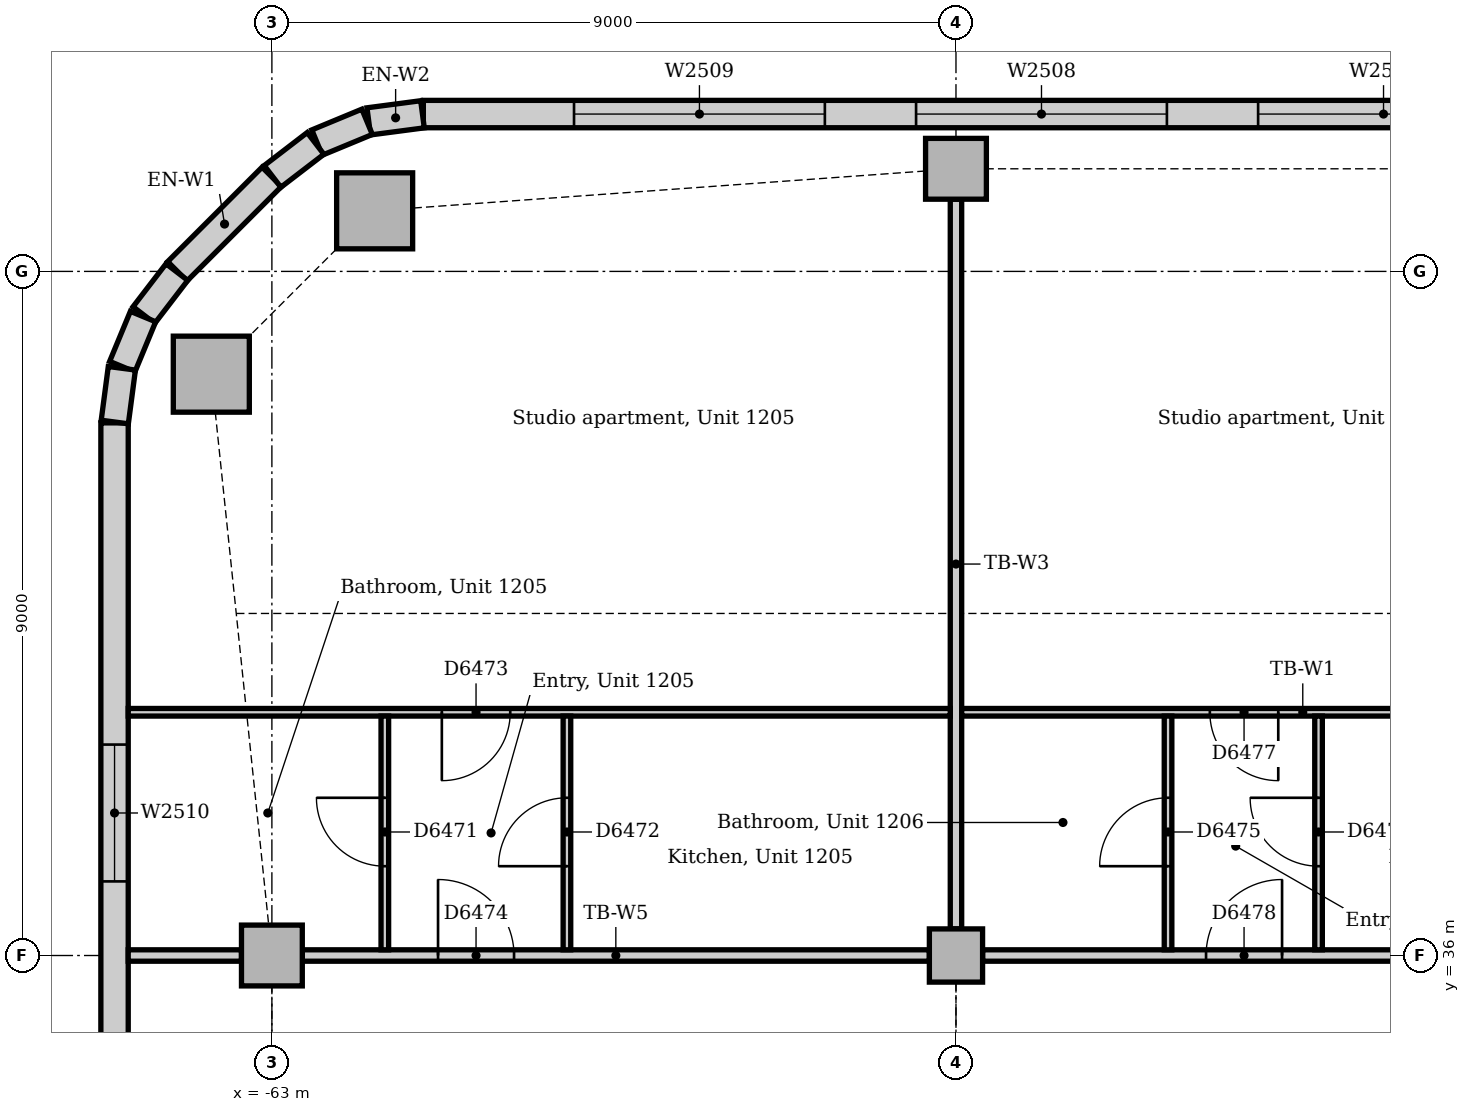
"""IFC4 building model, lengths in metres.
Left out: names, types, materials, properties, quantities, classifications, styles, units other than length and angle.
Written with IfcOpenShell. Run it as: python <this file> out.ifc"""

import sys

from ifc_helpers import new_model, si_unit, direction, frame, frame_2d, origin, origin_2d, place, context, subcontext, project, spatial, rectangle, extrude, element, fill, save


model = new_model("IFC4")
c1 = context("Model", 3, precision=1e-05, world=origin(), true_north=direction((0.0, 1.0)))
c2 = subcontext(c1, "Body", "Model", "MODEL_VIEW")
j1 = project(units=[si_unit("LENGTHUNIT", "METRE"), si_unit("PLANEANGLEUNIT", "RADIAN")], contexts=[c1])
p1 = place(None, origin())
s1 = spatial("IfcSite", under=j1, at=p1, CompositionType="ELEMENT")
p2 = place(p1, origin())
s2 = spatial("IfcBuilding", under=s1, at=p2, CompositionType="ELEMENT")
p3 = place(p2, frame((0.0, 0.0, 55.0)))
s3 = spatial("IfcBuildingStorey", under=s2, at=p3, CompositionType="ELEMENT", Elevation=55.0)
for number, where, z_axis, x_axis in (
    (1, (-61.648, 45.797, 0.0), (0.0, 0.0, 1.0), (1.0, 0.0, 0.0)),
    (2, (-63.797, 43.648, 0.0), (0.0, 0.0, 1.0), (1.0, 0.0, 0.0)),
):
    element("IfcColumn", number, at=place(p3, frame(where, z_axis=z_axis, x_axis=x_axis)), inside=s3, PredefinedType="COLUMN", context=c2, shape_type="SweptSolid", body=[
        extrude(rectangle(XDim=1.0, YDim=1.0, at=origin_2d()), origin(), (0.0, 0.0, 1.0), 3.85),
    ])
for number, where, z_axis, x_axis in (
    (3, (-54.0, 46.35, 0.0), (0.0, 0.0, 1.0), (1.0, 0.0, 0.0)),
    (4, (-63.0, 36.0, 0.0), (0.0, 0.0, 1.0), (1.0, 0.0, 0.0)),
):
    element("IfcColumn", number, at=place(p3, frame(where, z_axis=z_axis, x_axis=x_axis)), inside=s3, PredefinedType="COLUMN", context=c2, shape_type="SweptSolid", body=[
        extrude(rectangle(XDim=0.8, YDim=0.8, at=origin_2d()), origin(), (0.0, 0.0, 1.0), 3.85),
    ])
p4 = place(p3, frame((-54.0, 36.0, 0.0), z_axis=(0.0, 0.0, 1.0), x_axis=(1.0, 0.0, 0.0)))
e5 = element("IfcColumn", 5, at=p4, inside=s3, PredefinedType="COLUMN", context=c2, shape_type="SweptSolid", body=[
    extrude(rectangle(XDim=0.7, YDim=0.7, at=origin_2d()), origin(), (0.0, 0.0, 1.0), 3.85),
])
p5 = place(p3, frame((-31.243, 47.07, 0.0), z_axis=(0.0, 0.0, 1.0), x_axis=(-1.0, 0.0, 0.0)))
e6 = element("IfcWall", 6, at=p5, inside=s3, PredefinedType="STANDARD", context=c2, shape_type="SweptSolid", body=[
    extrude(rectangle(XDim=29.765, YDim=0.36, at=frame_2d((14.882, 0.0))), origin(), (0.0, 0.0, 1.0), 3.85),
])
p6 = place(p5, frame((1.982, 0.0, 0.9)))
e7 = element("IfcOpeningElement", 7, at=p6, cuts=e6, PredefinedType="OPENING", context=c2, shape_type="SweptSolid", body=[
    extrude(rectangle(XDim=3.3, YDim=1.6, at=frame_2d((1.65, 0.8))), frame((0.0, 0.19, 0.0), z_axis=(0.0, -1.0, 0.0), x_axis=(1.0, 0.0, 0.0)), (0.0, 0.0, 1.0), 0.38),
])
p7 = place(p5, frame((6.482, 0.0, 0.9)))
e8 = element("IfcOpeningElement", 8, at=p7, cuts=e6, PredefinedType="OPENING", context=c2, shape_type="SweptSolid", body=[
    extrude(rectangle(XDim=3.3, YDim=1.6, at=frame_2d((1.65, 0.8))), frame((0.0, 0.19, 0.0), z_axis=(0.0, -1.0, 0.0), x_axis=(1.0, 0.0, 0.0)), (0.0, 0.0, 1.0), 0.38),
])
p8 = place(p5, frame((10.982, 0.0, 0.9)))
e9 = element("IfcOpeningElement", 9, at=p8, cuts=e6, PredefinedType="OPENING", context=c2, shape_type="SweptSolid", body=[
    extrude(rectangle(XDim=3.3, YDim=1.6, at=frame_2d((1.65, 0.8))), frame((0.0, 0.19, 0.0), z_axis=(0.0, -1.0, 0.0), x_axis=(1.0, 0.0, 0.0)), (0.0, 0.0, 1.0), 0.38),
])
p9 = place(p5, frame((15.482, 0.0, 0.9)))
e10 = element("IfcOpeningElement", 10, at=p9, cuts=e6, PredefinedType="OPENING", context=c2, shape_type="SweptSolid", body=[
    extrude(rectangle(XDim=3.3, YDim=1.6, at=frame_2d((1.65, 0.8))), frame((0.0, 0.19, 0.0), z_axis=(0.0, -1.0, 0.0), x_axis=(1.0, 0.0, 0.0)), (0.0, 0.0, 1.0), 0.38),
])
p10 = place(p5, frame((19.982, 0.0, 0.9)))
e11 = element("IfcOpeningElement", 11, at=p10, cuts=e6, PredefinedType="OPENING", context=c2, shape_type="SweptSolid", body=[
    extrude(rectangle(XDim=3.3, YDim=1.6, at=frame_2d((1.65, 0.8))), frame((0.0, 0.19, 0.0), z_axis=(0.0, -1.0, 0.0), x_axis=(1.0, 0.0, 0.0)), (0.0, 0.0, 1.0), 0.38),
])
p11 = place(p5, frame((24.482, 0.0, 0.9)))
e12 = element("IfcOpeningElement", 12, at=p11, cuts=e6, PredefinedType="OPENING", context=c2, shape_type="SweptSolid", body=[
    extrude(rectangle(XDim=3.3, YDim=1.6, at=frame_2d((1.65, 0.8))), frame((0.0, 0.19, 0.0), z_axis=(0.0, -1.0, 0.0), x_axis=(1.0, 0.0, 0.0)), (0.0, 0.0, 1.0), 0.38),
])
p12 = place(p3, frame((-63.001, 46.244, 0.0), z_axis=(0.0, 0.0, 1.0), x_axis=(-0.707106781187, -0.707106781187, 0.0)))
e13 = element("IfcWall", 13, at=p12, inside=s3, PredefinedType="STANDARD", context=c2, shape_type="SweptSolid", body=[
    extrude(rectangle(XDim=1.757, YDim=0.36, at=frame_2d((0.879, 0.0))), origin(), (0.0, 0.0, 1.0), 3.85),
])
p13 = place(p3, frame((-65.07, 43.007, 0.0), z_axis=(0.0, 0.0, 1.0), x_axis=(0.0, -1.0, 0.0)))
e14 = element("IfcWall", 14, at=p13, inside=s3, PredefinedType="STANDARD", context=c2, shape_type="SweptSolid", body=[
    extrude(rectangle(XDim=23.765, YDim=0.36, at=frame_2d((11.882, 0.0))), origin(), (0.0, 0.0, 1.0), 3.85),
])
p14 = place(p13, frame((4.232, 0.0, 0.9)))
e15 = element("IfcOpeningElement", 15, at=p14, cuts=e14, PredefinedType="OPENING", context=c2, shape_type="SweptSolid", body=[
    extrude(rectangle(XDim=1.8, YDim=1.6, at=frame_2d((0.9, 0.8))), frame((0.0, 0.19, 0.0), z_axis=(0.0, -1.0, 0.0), x_axis=(1.0, 0.0, 0.0)), (0.0, 0.0, 1.0), 0.38),
])
p15 = place(p13, frame((9.332, 0.0, 0.9)))
e16 = element("IfcOpeningElement", 16, at=p15, cuts=e14, PredefinedType="OPENING", context=c2, shape_type="SweptSolid", body=[
    extrude(rectangle(XDim=1.8, YDim=1.6, at=frame_2d((0.9, 0.8))), frame((0.0, 0.19, 0.0), z_axis=(0.0, -1.0, 0.0), x_axis=(1.0, 0.0, 0.0)), (0.0, 0.0, 1.0), 0.38),
])
p16 = place(p13, frame((12.482, 0.0, 0.9)))
e17 = element("IfcOpeningElement", 17, at=p16, cuts=e14, PredefinedType="OPENING", context=c2, shape_type="SweptSolid", body=[
    extrude(rectangle(XDim=3.3, YDim=1.6, at=frame_2d((1.65, 0.8))), frame((0.0, 0.19, 0.0), z_axis=(0.0, -1.0, 0.0), x_axis=(1.0, 0.0, 0.0)), (0.0, 0.0, 1.0), 0.38),
])
p17 = place(p13, frame((16.982, 0.0, 0.9)))
e18 = element("IfcOpeningElement", 18, at=p17, cuts=e14, PredefinedType="OPENING", context=c2, shape_type="SweptSolid", body=[
    extrude(rectangle(XDim=3.3, YDim=1.6, at=frame_2d((1.65, 0.8))), frame((0.0, 0.19, 0.0), z_axis=(0.0, -1.0, 0.0), x_axis=(1.0, 0.0, 0.0)), (0.0, 0.0, 1.0), 0.38),
])
for number, where, z_axis, x_axis in (
    (19, (-61.019, 47.067, 0.0), (0.0, 0.0, 1.0), (-0.991, -0.131, 0.0)),
    (20, (-61.747, 46.968, 0.0), (0.0, 0.0, 1.0), (-0.924, -0.383, 0.0)),
):
    element("IfcWall", number, at=place(p3, frame(where, z_axis=z_axis, x_axis=x_axis)), inside=s3, PredefinedType="STANDARD", context=c2, shape_type="SweptSolid", body=[
        extrude(rectangle(XDim=0.713, YDim=0.36, at=frame_2d((0.356, 0.0))), origin(), (0.0, 0.0, 1.0), 3.85),
    ])
for number, where, z_axis, x_axis in (
    (21, (-62.425, 46.684, 0.0), (0.0, 0.0, 1.0), (-0.793, -0.609, 0.0)),
    (22, (-64.25, 44.991, 0.0), (0.0, 0.0, 1.0), (-0.609, -0.793, 0.0)),
):
    element("IfcWall", number, at=place(p3, frame(where, z_axis=z_axis, x_axis=x_axis)), inside=s3, PredefinedType="STANDARD", context=c2, shape_type="SweptSolid", body=[
        extrude(rectangle(XDim=0.713, YDim=0.36, at=frame_2d((0.357, 0.0))), origin(), (0.0, 0.0, 1.0), 3.85),
    ])
for number, where, z_axis, x_axis in (
    (23, (-64.695, 44.406, 0.0), (0.0, 0.0, 1.0), (-0.383, -0.924, 0.0)),
    (24, (-64.974, 43.726, 0.0), (0.0, 0.0, 1.0), (-0.131, -0.991, 0.0)),
):
    element("IfcWall", number, at=place(p3, frame(where, z_axis=z_axis, x_axis=x_axis)), inside=s3, PredefinedType="STANDARD", context=c2, shape_type="SweptSolid", body=[
        extrude(rectangle(XDim=0.713, YDim=0.36, at=frame_2d((0.356, 0.0))), origin(), (0.0, 0.0, 1.0), 3.85),
    ])
p18 = place(p3, frame((-53.65, 36.0, 0.0), z_axis=(0.0, 0.0, 1.0), x_axis=(1.0, 0.0, 0.0)))
e25 = element("IfcWall", 25, at=p18, inside=s3, PredefinedType="PARTITIONING", context=c2, shape_type="SweptSolid", body=[
    extrude(rectangle(XDim=8.3, YDim=0.15, at=frame_2d((4.15, 0.0))), origin(), (0.0, 0.0, 1.0), 3.158),
])
p19 = place(p18, frame((2.94, 0.0, 0.0)))
e26 = element("IfcOpeningElement", 26, at=p19, cuts=e25, PredefinedType="OPENING", context=c2, shape_type="SweptSolid", body=[
    extrude(rectangle(XDim=1.0, YDim=2.1, at=frame_2d((0.5, 1.05))), frame((0.0, 0.085, 0.0), z_axis=(0.0, -1.0, 0.0), x_axis=(1.0, 0.0, 0.0)), (0.0, 0.0, 1.0), 0.17),
])
p20 = place(p3, frame((-62.6, 36.0, 0.0), z_axis=(0.0, 0.0, 1.0), x_axis=(1.0, 0.0, 0.0)))
e27 = element("IfcWall", 27, at=p20, inside=s3, PredefinedType="PARTITIONING", context=c2, shape_type="SweptSolid", body=[
    extrude(rectangle(XDim=8.25, YDim=0.15, at=frame_2d((4.125, 0.0))), origin(), (0.0, 0.0, 1.0), 3.158),
])
p21 = place(p20, frame((1.786, 0.0, 0.0)))
e28 = element("IfcOpeningElement", 28, at=p21, cuts=e27, PredefinedType="OPENING", context=c2, shape_type="SweptSolid", body=[
    extrude(rectangle(XDim=1.0, YDim=2.1, at=frame_2d((0.5, 1.05))), frame((0.0, 0.085, 0.0), z_axis=(0.0, -1.0, 0.0), x_axis=(1.0, 0.0, 0.0)), (0.0, 0.0, 1.0), 0.17),
])
p22 = place(p3, frame((-64.89, 36.0, 0.0), z_axis=(0.0, 0.0, 1.0), x_axis=(1.0, 0.0, 0.0)))
e29 = element("IfcWall", 29, at=p22, inside=s3, PredefinedType="PARTITIONING", context=c2, shape_type="SweptSolid", body=[
    extrude(rectangle(XDim=1.49, YDim=0.15, at=frame_2d((0.745, 0.0))), origin(), (0.0, 0.0, 1.0), 3.85),
])
p23 = place(p3, frame((-54.0, 36.35, 0.0), z_axis=(0.0, 0.0, 1.0), x_axis=(0.0, 1.0, 0.0)))
e30 = element("IfcWall", 30, at=p23, inside=s3, PredefinedType="PARTITIONING", context=c2, shape_type="SweptSolid", body=[
    extrude(rectangle(XDim=9.6, YDim=0.15, at=frame_2d((4.8, 0.0))), origin(), (0.0, 0.0, 1.0), 3.256),
])
p24 = place(p3, frame((-53.925, 39.2, 0.0), z_axis=(0.0, 0.0, 1.0), x_axis=(1.0, 0.0, 0.0)))
e31 = element("IfcWall", 31, at=p24, inside=s3, PredefinedType="PARTITIONING", context=c2, shape_type="SweptSolid", body=[
    extrude(rectangle(XDim=8.975, YDim=0.1, at=frame_2d((4.487, 0.0))), origin(), (0.0, 0.0, 1.0), 3.85),
])
p25 = place(p24, frame((3.265, 0.0, 0.0)))
e32 = element("IfcOpeningElement", 32, at=p25, cuts=e31, PredefinedType="OPENING", context=c2, shape_type="SweptSolid", body=[
    extrude(rectangle(XDim=0.9, YDim=2.1, at=frame_2d((0.45, 1.05))), frame((0.0, 0.06, 0.0), z_axis=(0.0, -1.0, 0.0), x_axis=(1.0, 0.0, 0.0)), (0.0, 0.0, 1.0), 0.12),
])
p26 = place(p3, frame((-64.89, 39.2, 0.0), z_axis=(0.0, 0.0, 1.0), x_axis=(1.0, 0.0, 0.0)))
e33 = element("IfcWall", 33, at=p26, inside=s3, PredefinedType="PARTITIONING", context=c2, shape_type="SweptSolid", body=[
    extrude(rectangle(XDim=10.815, YDim=0.1, at=frame_2d((5.407, 0.0))), origin(), (0.0, 0.0, 1.0), 3.85),
])
p27 = place(p26, frame((4.126, 0.0, 0.0)))
e34 = element("IfcOpeningElement", 34, at=p27, cuts=e33, PredefinedType="OPENING", context=c2, shape_type="SweptSolid", body=[
    extrude(rectangle(XDim=0.9, YDim=2.1, at=frame_2d((0.45, 1.05))), frame((0.0, 0.06, 0.0), z_axis=(0.0, -1.0, 0.0), x_axis=(1.0, 0.0, 0.0)), (0.0, 0.0, 1.0), 0.12),
])
p28 = place(p3, frame((-61.514, 36.075, 0.0), z_axis=(0.0, 0.0, 1.0), x_axis=(0.0, 1.0, 0.0)))
e35 = element("IfcWall", 35, at=p28, inside=s3, PredefinedType="PARTITIONING", context=c2, shape_type="SweptSolid", body=[
    extrude(rectangle(XDim=3.075, YDim=0.1, at=frame_2d((1.538, 0.0))), origin(), (0.0, 0.0, 1.0), 3.85),
])
p29 = place(p28, frame((1.1, 0.0, 0.0)))
e36 = element("IfcOpeningElement", 36, at=p29, cuts=e35, PredefinedType="OPENING", context=c2, shape_type="SweptSolid", body=[
    extrude(rectangle(XDim=0.9, YDim=2.1, at=frame_2d((0.45, 1.05))), frame((0.0, 0.06, 0.0), z_axis=(0.0, -1.0, 0.0), x_axis=(1.0, 0.0, 0.0)), (0.0, 0.0, 1.0), 0.12),
])
p30 = place(p3, frame((-59.118, 36.075, 0.0), z_axis=(0.0, 0.0, 1.0), x_axis=(0.0, 1.0, 0.0)))
e37 = element("IfcWall", 37, at=p30, inside=s3, PredefinedType="PARTITIONING", context=c2, shape_type="SweptSolid", body=[
    extrude(rectangle(XDim=3.075, YDim=0.1, at=frame_2d((1.538, 0.0))), origin(), (0.0, 0.0, 1.0), 3.85),
])
p31 = place(p30, frame((1.1, 0.0, 0.0)))
e38 = element("IfcOpeningElement", 38, at=p31, cuts=e37, PredefinedType="OPENING", context=c2, shape_type="SweptSolid", body=[
    extrude(rectangle(XDim=0.9, YDim=2.1, at=frame_2d((0.45, 1.05))), frame((0.0, 0.06, 0.0), z_axis=(0.0, -1.0, 0.0), x_axis=(1.0, 0.0, 0.0)), (0.0, 0.0, 1.0), 0.12),
])
p32 = place(p3, frame((-51.21, 36.075, 0.0), z_axis=(0.0, 0.0, 1.0), x_axis=(0.0, 1.0, 0.0)))
e39 = element("IfcWall", 39, at=p32, inside=s3, PredefinedType="PARTITIONING", context=c2, shape_type="SweptSolid", body=[
    extrude(rectangle(XDim=3.075, YDim=0.1, at=frame_2d((1.538, 0.0))), origin(), (0.0, 0.0, 1.0), 3.85),
])
p33 = place(p32, frame((1.1, 0.0, 0.0)))
e40 = element("IfcOpeningElement", 40, at=p33, cuts=e39, PredefinedType="OPENING", context=c2, shape_type="SweptSolid", body=[
    extrude(rectangle(XDim=0.9, YDim=2.1, at=frame_2d((0.45, 1.05))), frame((0.0, 0.06, 0.0), z_axis=(0.0, -1.0, 0.0), x_axis=(1.0, 0.0, 0.0)), (0.0, 0.0, 1.0), 0.12),
])
p34 = place(p3, frame((-49.23, 36.075, 0.0), z_axis=(0.0, 0.0, 1.0), x_axis=(0.0, 1.0, 0.0)))
e41 = element("IfcWall", 41, at=p34, inside=s3, PredefinedType="PARTITIONING", context=c2, shape_type="SweptSolid", body=[
    extrude(rectangle(XDim=3.075, YDim=0.1, at=frame_2d((1.538, 0.0))), origin(), (0.0, 0.0, 1.0), 3.85),
])
p35 = place(p34, frame((1.1, 0.0, 0.0)))
e42 = element("IfcOpeningElement", 42, at=p35, cuts=e41, PredefinedType="OPENING", context=c2, shape_type="SweptSolid", body=[
    extrude(rectangle(XDim=0.9, YDim=2.1, at=frame_2d((0.45, 1.05))), frame((0.0, 0.06, 0.0), z_axis=(0.0, -1.0, 0.0), x_axis=(1.0, 0.0, 0.0)), (0.0, 0.0, 1.0), 0.12),
])
p36 = place(p9, origin())
e43 = element("IfcWindow", 43, at=p36, inside=s3, PartitioningType="SINGLE_PANEL", PredefinedType="WINDOW", context=c2, shape_type="SweptSolid", body=[
    extrude(rectangle(XDim=3.3, YDim=1.6, at=frame_2d((1.65, 0.8))), frame((0.0, 0.13, 0.0), z_axis=(0.0, -1.0, 0.0), x_axis=(1.0, 0.0, 0.0)), (0.0, 0.0, 1.0), 0.06),
])
fill(e10, e43)
p37 = place(p10, origin())
e44 = element("IfcWindow", 44, at=p37, inside=s3, PartitioningType="SINGLE_PANEL", PredefinedType="WINDOW", context=c2, shape_type="SweptSolid", body=[
    extrude(rectangle(XDim=3.3, YDim=1.6, at=frame_2d((1.65, 0.8))), frame((0.0, 0.13, 0.0), z_axis=(0.0, -1.0, 0.0), x_axis=(1.0, 0.0, 0.0)), (0.0, 0.0, 1.0), 0.06),
])
fill(e11, e44)
p38 = place(p11, origin())
e45 = element("IfcWindow", 45, at=p38, inside=s3, PartitioningType="SINGLE_PANEL", PredefinedType="WINDOW", context=c2, shape_type="SweptSolid", body=[
    extrude(rectangle(XDim=3.3, YDim=1.6, at=frame_2d((1.65, 0.8))), frame((0.0, 0.13, 0.0), z_axis=(0.0, -1.0, 0.0), x_axis=(1.0, 0.0, 0.0)), (0.0, 0.0, 1.0), 0.06),
])
fill(e12, e45)
p39 = place(p14, origin())
e46 = element("IfcWindow", 46, at=p39, inside=s3, PartitioningType="SINGLE_PANEL", PredefinedType="WINDOW", context=c2, shape_type="SweptSolid", body=[
    extrude(rectangle(XDim=1.8, YDim=1.6, at=frame_2d((0.9, 0.8))), frame((0.0, 0.13, 0.0), z_axis=(0.0, -1.0, 0.0), x_axis=(1.0, 0.0, 0.0)), (0.0, 0.0, 1.0), 0.06),
])
fill(e15, e46)
p40 = place(p29, origin())
e47 = element("IfcDoor", 47, at=p40, inside=s3, OperationType="SINGLE_SWING_RIGHT", PredefinedType="DOOR", context=c2, shape_type="SweptSolid", body=[
    extrude(rectangle(XDim=0.9, YDim=2.1, at=frame_2d((0.45, 1.05))), frame((0.0, 0.025, 0.0), z_axis=(0.0, -1.0, 0.0), x_axis=(1.0, 0.0, 0.0)), (0.0, 0.0, 1.0), 0.05),
])
fill(e36, e47)
p41 = place(p31, origin())
e48 = element("IfcDoor", 48, at=p41, inside=s3, OperationType="SINGLE_SWING_LEFT", PredefinedType="DOOR", context=c2, shape_type="SweptSolid", body=[
    extrude(rectangle(XDim=0.9, YDim=2.1, at=frame_2d((0.45, 1.05))), frame((0.0, 0.025, 0.0), z_axis=(0.0, -1.0, 0.0), x_axis=(1.0, 0.0, 0.0)), (0.0, 0.0, 1.0), 0.05),
])
fill(e38, e48)
p42 = place(p27, frame((0.9, 0.0, 0.0), z_axis=(0.0, 0.0, 1.0), x_axis=(-1.0, 0.0, 0.0)))
e49 = element("IfcDoor", 49, at=p42, inside=s3, OperationType="SINGLE_SWING_RIGHT", PredefinedType="DOOR", context=c2, shape_type="SweptSolid", body=[
    extrude(rectangle(XDim=0.9, YDim=2.1, at=frame_2d((0.45, 1.05))), frame((0.0, 0.025, 0.0), z_axis=(0.0, -1.0, 0.0), x_axis=(1.0, 0.0, 0.0)), (0.0, 0.0, 1.0), 0.05),
])
fill(e34, e49)
p43 = place(p21, origin())
e50 = element("IfcDoor", 50, at=p43, inside=s3, OperationType="SINGLE_SWING_LEFT", PredefinedType="DOOR", context=c2, shape_type="SweptSolid", body=[
    extrude(rectangle(XDim=1.0, YDim=2.1, at=frame_2d((0.5, 1.05))), frame((0.0, 0.025, 0.0), z_axis=(0.0, -1.0, 0.0), x_axis=(1.0, 0.0, 0.0)), (0.0, 0.0, 1.0), 0.05),
])
fill(e28, e50)
p44 = place(p33, origin())
e51 = element("IfcDoor", 51, at=p44, inside=s3, OperationType="SINGLE_SWING_LEFT", PredefinedType="DOOR", context=c2, shape_type="SweptSolid", body=[
    extrude(rectangle(XDim=0.9, YDim=2.1, at=frame_2d((0.45, 1.05))), frame((0.0, 0.025, 0.0), z_axis=(0.0, -1.0, 0.0), x_axis=(1.0, 0.0, 0.0)), (0.0, 0.0, 1.0), 0.05),
])
fill(e40, e51)
p45 = place(p35, origin())
e52 = element("IfcDoor", 52, at=p45, inside=s3, OperationType="SINGLE_SWING_RIGHT", PredefinedType="DOOR", context=c2, shape_type="SweptSolid", body=[
    extrude(rectangle(XDim=0.9, YDim=2.1, at=frame_2d((0.45, 1.05))), frame((0.0, 0.025, 0.0), z_axis=(0.0, -1.0, 0.0), x_axis=(1.0, 0.0, 0.0)), (0.0, 0.0, 1.0), 0.05),
])
fill(e42, e52)
p46 = place(p25, frame((0.9, 0.0, 0.0), z_axis=(0.0, 0.0, 1.0), x_axis=(-1.0, 0.0, 0.0)))
e53 = element("IfcDoor", 53, at=p46, inside=s3, OperationType="SINGLE_SWING_LEFT", PredefinedType="DOOR", context=c2, shape_type="SweptSolid", body=[
    extrude(rectangle(XDim=0.9, YDim=2.1, at=frame_2d((0.45, 1.05))), frame((0.0, 0.025, 0.0), z_axis=(0.0, -1.0, 0.0), x_axis=(1.0, 0.0, 0.0)), (0.0, 0.0, 1.0), 0.05),
])
fill(e32, e53)
p47 = place(p19, origin())
e54 = element("IfcDoor", 54, at=p47, inside=s3, OperationType="SINGLE_SWING_RIGHT", PredefinedType="DOOR", context=c2, shape_type="SweptSolid", body=[
    extrude(rectangle(XDim=1.0, YDim=2.1, at=frame_2d((0.5, 1.05))), frame((0.0, 0.025, 0.0), z_axis=(0.0, -1.0, 0.0), x_axis=(1.0, 0.0, 0.0)), (0.0, 0.0, 1.0), 0.05),
])
fill(e26, e54)
save(model, sys.argv[1])
